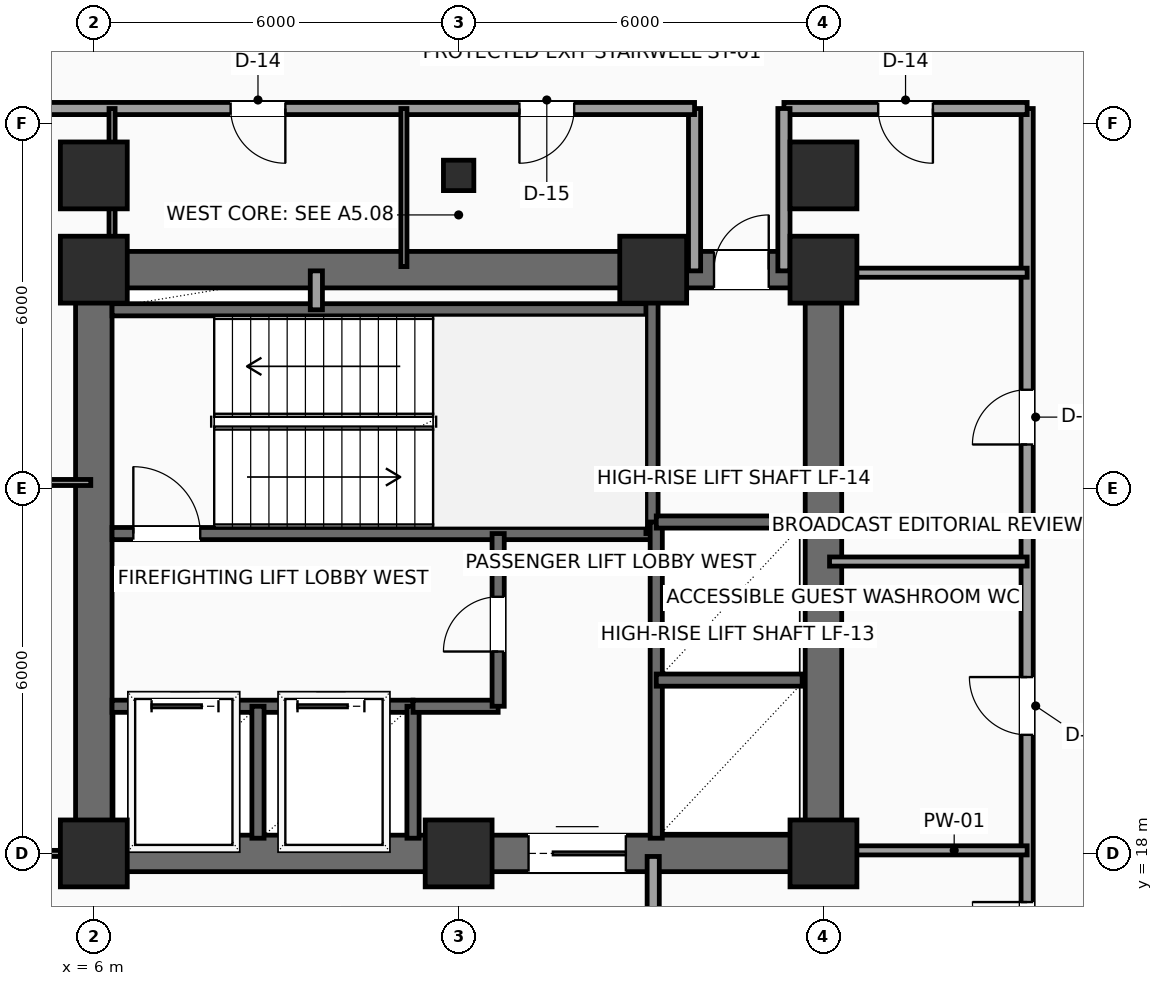
"""IFC4 building model, lengths in metres.
Left out: names, types, materials, properties, quantities, classifications, styles, units other than length and angle.
Written with IfcOpenShell. Run it as: python <this file> out.ifc"""

import sys

from ifc_helpers import new_model, si_unit, direction, frame, frame_2d, origin, origin_2d, place, context, subcontext, project, spatial, rectangle, hollow_rectangle, extrude, element, fill, save


model = new_model("IFC4")
c1 = context("Model", 3, precision=1e-05, world=origin(), true_north=direction((0.0, 1.0)))
c2 = subcontext(c1, "Body", "Model", "MODEL_VIEW")
j1 = project(units=[si_unit("LENGTHUNIT", "METRE"), si_unit("PLANEANGLEUNIT", "RADIAN")], contexts=[c1])
p1 = place(None, origin())
s1 = spatial("IfcSite", under=j1, at=p1, CompositionType="ELEMENT")
p2 = place(p1, origin())
s2 = spatial("IfcBuilding", under=s1, at=p2, CompositionType="ELEMENT")
p3 = place(p2, frame((0.0, 0.0, 138.15)))
s3 = spatial("IfcBuildingStorey", under=s2, at=p3, CompositionType="ELEMENT", Elevation=138.15)
for number, where, z_axis, x_axis in (
    (1, (6.0, 18.0, 0.0), (0.0, 0.0, 1.0), (1.0, 0.0, 0.0)),
    (2, (12.0, 18.0, 0.0), (0.0, 0.0, 1.0), (1.0, 0.0, 0.0)),
    (3, (18.0, 18.0, 0.0), (0.0, 0.0, 1.0), (1.0, 0.0, 0.0)),
    (4, (6.0, 27.6, 0.0), (0.0, 0.0, 1.0), (1.0, 0.0, 0.0)),
    (5, (15.2, 27.6, 0.0), (0.0, 0.0, 1.0), (1.0, 0.0, 0.0)),
    (6, (18.0, 27.6, 0.0), (0.0, 0.0, 1.0), (1.0, 0.0, 0.0)),
    (7, (6.0, 29.15, 0.0), (0.0, 0.0, 1.0), (1.0, 0.0, 0.0)),
):
    element("IfcColumn", number, at=place(p3, frame(where, z_axis=z_axis, x_axis=x_axis)), inside=s3, PredefinedType="COLUMN", context=c2, shape_type="SweptSolid", body=[
        extrude(rectangle(XDim=1.1, YDim=1.1, at=origin_2d()), origin(), (0.0, 0.0, 1.0), 3.75),
    ])
p4 = place(p3, frame((12.0, 29.15, 0.0), z_axis=(0.0, 0.0, 1.0), x_axis=(1.0, 0.0, 0.0)))
e8 = element("IfcColumn", 8, at=p4, inside=s3, PredefinedType="COLUMN", context=c2, shape_type="SweptSolid", body=[
    extrude(hollow_rectangle(XDim=0.5, YDim=0.5, WallThickness=0.025, InnerFilletRadius=0.025, OuterFilletRadius=0.04, at=origin_2d()), origin(), (0.0, 0.0, 1.0), 3.75),
])
p5 = place(p3, frame((18.0, 29.15, 0.0), z_axis=(0.0, 0.0, 1.0), x_axis=(1.0, 0.0, 0.0)))
e9 = element("IfcColumn", 9, at=p5, inside=s3, PredefinedType="COLUMN", context=c2, shape_type="SweptSolid", body=[
    extrude(rectangle(XDim=1.1, YDim=1.1, at=origin_2d()), origin(), (0.0, 0.0, 1.0), 3.75),
])
p6 = place(p3, frame((6.0, 18.0, 0.0), z_axis=(0.0, 0.0, 1.0), x_axis=(1.0, 0.0, 0.0)))
e10 = element("IfcWall", 10, at=p6, inside=s3, PredefinedType="SHEAR", context=c2, shape_type="SweptSolid", body=[
    extrude(rectangle(XDim=12.0, YDim=0.6, at=frame_2d((6.0, 0.0))), origin(), (0.0, 0.0, 1.0), 3.525),
])
p7 = place(p6, frame((7.15, 0.0, 0.0)))
e11 = element("IfcOpeningElement", 11, at=p7, cuts=e10, PredefinedType="OPENING", context=c2, shape_type="SweptSolid", body=[
    extrude(rectangle(XDim=1.6, YDim=2.3, at=frame_2d((0.8, 1.15))), frame((0.0, 0.31, 0.0), z_axis=(0.0, -1.0, 0.0), x_axis=(1.0, 0.0, 0.0)), (0.0, 0.0, 1.0), 0.62),
])
p8 = place(p3, frame((6.0, 27.6, 0.0), z_axis=(0.0, 0.0, 1.0), x_axis=(1.0, 0.0, 0.0)))
e12 = element("IfcWall", 12, at=p8, inside=s3, PredefinedType="SHEAR", context=c2, shape_type="SweptSolid", body=[
    extrude(rectangle(XDim=12.0, YDim=0.6, at=frame_2d((6.0, 0.0))), origin(), (0.0, 0.0, 1.0), 3.525),
])
p9 = place(p8, frame((10.2, 0.0, 0.0)))
e13 = element("IfcOpeningElement", 13, at=p9, cuts=e12, PredefinedType="OPENING", context=c2, shape_type="SweptSolid", body=[
    extrude(rectangle(XDim=0.9, YDim=2.15, at=frame_2d((0.45, 1.075))), frame((0.0, 0.31, 0.0), z_axis=(0.0, -1.0, 0.0), x_axis=(1.0, 0.0, 0.0)), (0.0, 0.0, 1.0), 0.62),
])
for number, where, z_axis, x_axis in (
    (14, (6.0, 18.0, 0.0), (0.0, 0.0, 1.0), (0.0, 1.0, 0.0)),
    (15, (18.0, 18.0, 0.0), (0.0, 0.0, 1.0), (0.0, 1.0, 0.0)),
):
    element("IfcWall", number, at=place(p3, frame(where, z_axis=z_axis, x_axis=x_axis)), inside=s3, PredefinedType="SHEAR", context=c2, shape_type="SweptSolid", body=[
        extrude(rectangle(XDim=9.6, YDim=0.6, at=frame_2d((4.8, 0.0))), origin(), (0.0, 0.0, 1.0), 3.525),
    ])
p10 = place(p3, frame((6.3, 23.26, 0.0), z_axis=(0.0, 0.0, 1.0), x_axis=(1.0, 0.0, 0.0)))
e16 = element("IfcWall", 16, at=p10, inside=s3, PredefinedType="SHEAR", context=c2, shape_type="SweptSolid", body=[
    extrude(rectangle(XDim=8.88, YDim=0.2, at=frame_2d((4.44, 0.0))), origin(), (0.0, 0.0, 1.0), 3.525),
])
p11 = place(p10, frame((0.35, 0.0, 0.0)))
e17 = element("IfcOpeningElement", 17, at=p11, cuts=e16, PredefinedType="OPENING", context=c2, shape_type="SweptSolid", body=[
    extrude(rectangle(XDim=1.1, YDim=2.2, at=frame_2d((0.55, 1.1))), frame((0.0, 0.11, 0.0), z_axis=(0.0, -1.0, 0.0), x_axis=(1.0, 0.0, 0.0)), (0.0, 0.0, 1.0), 0.22),
])
p12 = place(p3, frame((6.3, 26.94, 0.0), z_axis=(0.0, 0.0, 1.0), x_axis=(1.0, 0.0, 0.0)))
e18 = element("IfcWall", 18, at=p12, inside=s3, PredefinedType="SHEAR", context=c2, shape_type="SweptSolid", body=[
    extrude(rectangle(XDim=8.88, YDim=0.2, at=frame_2d((4.44, 0.0))), origin(), (0.0, 0.0, 1.0), 3.525),
])
p13 = place(p3, frame((15.18, 23.26, 0.0), z_axis=(0.0, 0.0, 1.0), x_axis=(0.0, 1.0, 0.0)))
e19 = element("IfcWall", 19, at=p13, inside=s3, PredefinedType="SHEAR", context=c2, shape_type="SweptSolid", body=[
    extrude(rectangle(XDim=4.04, YDim=0.2, at=frame_2d((2.02, 0.0))), origin(), (0.0, 0.0, 1.0), 3.525),
])
p14 = place(p3, frame((6.3, 20.42, 0.0), z_axis=(0.0, 0.0, 1.0), x_axis=(1.0, 0.0, 0.0)))
e20 = element("IfcWall", 20, at=p14, inside=s3, PredefinedType="SHEAR", context=c2, shape_type="SweptSolid", body=[
    extrude(rectangle(XDim=4.95, YDim=0.2, at=frame_2d((2.475, 0.0))), origin(), (0.0, 0.0, 1.0), 3.525),
])
p15 = place(p14, frame((0.65, 0.0, 0.0)))
e21 = element("IfcOpeningElement", 21, at=p15, cuts=e20, PredefinedType="OPENING", context=c2, shape_type="SweptSolid", body=[
    extrude(rectangle(XDim=1.1, YDim=2.2, at=frame_2d((0.55, 1.1))), frame((0.0, 0.11, 0.0), z_axis=(0.0, -1.0, 0.0), x_axis=(1.0, 0.0, 0.0)), (0.0, 0.0, 1.0), 0.22),
])
p16 = place(p14, frame((3.05, 0.0, 0.0)))
e22 = element("IfcOpeningElement", 22, at=p16, cuts=e20, PredefinedType="OPENING", context=c2, shape_type="SweptSolid", body=[
    extrude(rectangle(XDim=1.1, YDim=2.2, at=frame_2d((0.55, 1.1))), frame((0.0, 0.11, 0.0), z_axis=(0.0, -1.0, 0.0), x_axis=(1.0, 0.0, 0.0)), (0.0, 0.0, 1.0), 0.22),
])
for number, where, z_axis, x_axis in (
    (23, (8.7, 18.25, 0.0), (0.0, 0.0, 1.0), (0.0, 1.0, 0.0)),
    (24, (11.25, 18.25, 0.0), (0.0, 0.0, 1.0), (0.0, 1.0, 0.0)),
):
    element("IfcWall", number, at=place(p3, frame(where, z_axis=z_axis, x_axis=x_axis)), inside=s3, PredefinedType="SHEAR", context=c2, shape_type="SweptSolid", body=[
        extrude(rectangle(XDim=2.17, YDim=0.2, at=frame_2d((1.085, 0.0))), origin(), (0.0, 0.0, 1.0), 3.525),
    ])
p17 = place(p3, frame((11.25, 20.42, 0.0), z_axis=(0.0, 0.0, 1.0), x_axis=(1.0, 0.0, 0.0)))
e25 = element("IfcWall", 25, at=p17, inside=s3, PredefinedType="SHEAR", context=c2, shape_type="SweptSolid", body=[
    extrude(rectangle(XDim=1.4, YDim=0.2, at=frame_2d((0.7, 0.0))), origin(), (0.0, 0.0, 1.0), 3.525),
])
p18 = place(p3, frame((12.65, 20.42, 0.0), z_axis=(0.0, 0.0, 1.0), x_axis=(0.0, 1.0, 0.0)))
e26 = element("IfcWall", 26, at=p18, inside=s3, PredefinedType="SHEAR", context=c2, shape_type="SweptSolid", body=[
    extrude(rectangle(XDim=2.84, YDim=0.2, at=frame_2d((1.42, 0.0))), origin(), (0.0, 0.0, 1.0), 3.525),
])
p19 = place(p18, frame((0.9, 0.0, 0.0)))
e27 = element("IfcOpeningElement", 27, at=p19, cuts=e26, PredefinedType="OPENING", context=c2, shape_type="SweptSolid", body=[
    extrude(rectangle(XDim=0.9, YDim=2.15, at=frame_2d((0.45, 1.075))), frame((0.0, 0.11, 0.0), z_axis=(0.0, -1.0, 0.0), x_axis=(1.0, 0.0, 0.0)), (0.0, 0.0, 1.0), 0.22),
])
p20 = place(p3, frame((9.66, 26.94, 0.0), z_axis=(0.0, 0.0, 1.0), x_axis=(0.0, 1.0, 0.0)))
e28 = element("IfcWall", 28, at=p20, inside=s3, PredefinedType="SOLIDWALL", context=c2, shape_type="SweptSolid", body=[
    extrude(rectangle(XDim=0.64, YDim=0.2, at=frame_2d((0.32, 0.0))), origin(), (0.0, 0.0, 1.0), 3.525),
])
p21 = place(p3, frame((15.25, 18.25, 0.0), z_axis=(0.0, 0.0, 1.0), x_axis=(0.0, 1.0, 0.0)))
e29 = element("IfcWall", 29, at=p21, inside=s3, PredefinedType="SHEAR", context=c2, shape_type="SweptSolid", body=[
    extrude(rectangle(XDim=5.2, YDim=0.2, at=frame_2d((2.6, 0.0))), origin(), (0.0, 0.0, 1.0), 3.525),
])
p22 = place(p3, frame((15.25, 20.85, 0.0), z_axis=(0.0, 0.0, 1.0), x_axis=(1.0, 0.0, 0.0)))
e30 = element("IfcWall", 30, at=p22, inside=s3, PredefinedType="SHEAR", context=c2, shape_type="SweptSolid", body=[
    extrude(rectangle(XDim=2.4, YDim=0.2, at=frame_2d((1.2, 0.0))), origin(), (0.0, 0.0, 1.0), 3.525),
])
p23 = place(p3, frame((15.25, 23.45, 0.0), z_axis=(0.0, 0.0, 1.0), x_axis=(1.0, 0.0, 0.0)))
e31 = element("IfcWall", 31, at=p23, inside=s3, PredefinedType="SHEAR", context=c2, shape_type="SweptSolid", body=[
    extrude(rectangle(XDim=2.45, YDim=0.2, at=frame_2d((1.225, 0.0))), origin(), (0.0, 0.0, 1.0), 3.525),
])
p24 = place(p3, frame((15.2, 17.95, 0.0), z_axis=(0.0, 0.0, 1.0), x_axis=(0.0, -1.0, 0.0)))
e32 = element("IfcWall", 32, at=p24, inside=s3, PredefinedType="PARTITIONING", context=c2, shape_type="SweptSolid", body=[
    extrude(rectangle(XDim=2.4, YDim=0.2, at=frame_2d((1.2, 0.0))), origin(), (0.0, 0.0, 1.0), 3.525),
])
p25 = place(p3, frame((21.35, 11.25, 0.0), z_axis=(0.0, 0.0, 1.0), x_axis=(0.0, 1.0, 0.0)))
e33 = element("IfcWall", 33, at=p25, inside=s3, PredefinedType="PARTITIONING", context=c2, shape_type="SweptSolid", body=[
    extrude(rectangle(XDim=19.0, YDim=0.2, at=frame_2d((9.5, 0.0))), origin(), (0.0, 0.0, 1.0), 3.525),
])
p26 = place(p25, frame((8.7, 0.0, 0.0)))
e34 = element("IfcOpeningElement", 34, at=p26, cuts=e33, PredefinedType="OPENING", context=c2, shape_type="SweptSolid", body=[
    extrude(rectangle(XDim=0.95, YDim=2.15, at=frame_2d((0.475, 1.075))), frame((0.0, 0.11, 0.0), z_axis=(0.0, -1.0, 0.0), x_axis=(1.0, 0.0, 0.0)), (0.0, 0.0, 1.0), 0.22),
])
p27 = place(p25, frame((13.475, 0.0, 0.0)))
e35 = element("IfcOpeningElement", 35, at=p27, cuts=e33, PredefinedType="OPENING", context=c2, shape_type="SweptSolid", body=[
    extrude(rectangle(XDim=0.9, YDim=2.1, at=frame_2d((0.45, 1.05))), frame((0.0, 0.11, 0.0), z_axis=(0.0, -1.0, 0.0), x_axis=(1.0, 0.0, 0.0)), (0.0, 0.0, 1.0), 0.22),
])
p28 = place(p25, frame((5.05, 0.0, 0.0)))
e36 = element("IfcOpeningElement", 36, at=p28, cuts=e33, PredefinedType="OPENING", context=c2, shape_type="SweptSolid", body=[
    extrude(rectangle(XDim=0.9, YDim=2.1, at=frame_2d((0.45, 1.05))), frame((0.0, 0.11, 0.0), z_axis=(0.0, -1.0, 0.0), x_axis=(1.0, 0.0, 0.0)), (0.0, 0.0, 1.0), 0.22),
])
p29 = place(p3, frame((21.35, 30.25, 0.0), z_axis=(0.0, 0.0, 1.0), x_axis=(-1.0, 0.0, 0.0)))
e37 = element("IfcWall", 37, at=p29, inside=s3, PredefinedType="PARTITIONING", context=c2, shape_type="SweptSolid", body=[
    extrude(rectangle(XDim=4.0, YDim=0.2, at=frame_2d((2.0, 0.0))), origin(), (0.0, 0.0, 1.0), 3.525),
])
p30 = place(p29, frame((1.55, 0.0, 0.0)))
e38 = element("IfcOpeningElement", 38, at=p30, cuts=e37, PredefinedType="OPENING", context=c2, shape_type="SweptSolid", body=[
    extrude(rectangle(XDim=0.9, YDim=2.1, at=frame_2d((0.45, 1.05))), frame((0.0, 0.11, 0.0), z_axis=(0.0, -1.0, 0.0), x_axis=(1.0, 0.0, 0.0)), (0.0, 0.0, 1.0), 0.22),
])
for number, where, z_axis, x_axis in (
    (39, (17.35, 30.25, 0.0), (0.0, 0.0, 1.0), (0.0, -1.0, 0.0)),
    (40, (15.88, 27.58, 0.0), (0.0, 0.0, 1.0), (0.0, 1.0, 0.0)),
):
    element("IfcWall", number, at=place(p3, frame(where, z_axis=z_axis, x_axis=x_axis)), inside=s3, PredefinedType="PARTITIONING", context=c2, shape_type="SweptSolid", body=[
        extrude(rectangle(XDim=2.67, YDim=0.2, at=frame_2d((1.335, 0.0))), origin(), (0.0, 0.0, 1.0), 3.525),
    ])
p31 = place(p3, frame((15.88, 30.25, 0.0), z_axis=(0.0, 0.0, 1.0), x_axis=(-1.0, 0.0, 0.0)))
e41 = element("IfcWall", 41, at=p31, inside=s3, PredefinedType="PARTITIONING", context=c2, shape_type="SweptSolid", body=[
    extrude(rectangle(XDim=15.58, YDim=0.2, at=frame_2d((7.79, 0.0))), origin(), (0.0, 0.0, 1.0), 3.525),
])
p32 = place(p31, frame((12.28, 0.0, 0.0)))
e42 = element("IfcOpeningElement", 42, at=p32, cuts=e41, PredefinedType="OPENING", context=c2, shape_type="SweptSolid", body=[
    extrude(rectangle(XDim=0.9, YDim=2.1, at=frame_2d((0.45, 1.05))), frame((0.0, 0.11, 0.0), z_axis=(0.0, -1.0, 0.0), x_axis=(1.0, 0.0, 0.0)), (0.0, 0.0, 1.0), 0.22),
])
p33 = place(p31, frame((6.73, 0.0, 0.0)))
e43 = element("IfcOpeningElement", 43, at=p33, cuts=e41, PredefinedType="OPENING", context=c2, shape_type="SweptSolid", body=[
    extrude(rectangle(XDim=0.9, YDim=2.1, at=frame_2d((0.45, 1.05))), frame((0.0, 0.11, 0.0), z_axis=(0.0, -1.0, 0.0), x_axis=(1.0, 0.0, 0.0)), (0.0, 0.0, 1.0), 0.22),
])
p34 = place(p31, frame((1.98, 0.0, 0.0)))
e44 = element("IfcOpeningElement", 44, at=p34, cuts=e41, PredefinedType="OPENING", context=c2, shape_type="SweptSolid", body=[
    extrude(rectangle(XDim=0.9, YDim=2.1, at=frame_2d((0.45, 1.05))), frame((0.0, 0.11, 0.0), z_axis=(0.0, -1.0, 0.0), x_axis=(1.0, 0.0, 0.0)), (0.0, 0.0, 1.0), 0.22),
])
p35 = place(p3, frame((18.1, 18.05, 0.0), z_axis=(0.0, 0.0, 1.0), x_axis=(1.0, 0.0, 0.0)))
e45 = element("IfcWall", 45, at=p35, inside=s3, PredefinedType="PARTITIONING", context=c2, shape_type="SweptSolid", body=[
    extrude(rectangle(XDim=3.25, YDim=0.15, at=frame_2d((1.625, 0.0))), origin(), (0.0, 0.0, 1.0), 3.017),
])
for number, where, z_axis, x_axis in (
    (46, (18.1, 22.8, 0.0), (0.0, 0.0, 1.0), (1.0, 0.0, 0.0)),
    (47, (18.1, 27.55, 0.0), (0.0, 0.0, 1.0), (1.0, 0.0, 0.0)),
):
    element("IfcWall", number, at=place(p3, frame(where, z_axis=z_axis, x_axis=x_axis)), inside=s3, PredefinedType="PARTITIONING", context=c2, shape_type="SweptSolid", body=[
        extrude(rectangle(XDim=3.25, YDim=0.15, at=frame_2d((1.625, 0.0))), origin(), (0.0, 0.0, 1.0), 3.525),
    ])
p36 = place(p3, frame((0.3, 18.0, 0.0), z_axis=(0.0, 0.0, 1.0), x_axis=(1.0, 0.0, 0.0)))
e48 = element("IfcWall", 48, at=p36, inside=s3, PredefinedType="PARTITIONING", context=c2, shape_type="SweptSolid", body=[
    extrude(rectangle(XDim=5.65, YDim=0.1, at=frame_2d((2.825, 0.0))), origin(), (0.0, 0.0, 1.0), 3.017),
])
p37 = place(p36, frame((2.4, 0.0, 0.0)))
e49 = element("IfcOpeningElement", 49, at=p37, cuts=e48, PredefinedType="OPENING", context=c2, shape_type="SweptSolid", body=[
    extrude(rectangle(XDim=0.9, YDim=2.1, at=frame_2d((0.45, 1.05))), frame((0.0, 0.06, 0.0), z_axis=(0.0, -1.0, 0.0), x_axis=(1.0, 0.0, 0.0)), (0.0, 0.0, 1.0), 0.12),
])
p38 = place(p3, frame((0.3, 24.1, 0.0), z_axis=(0.0, 0.0, 1.0), x_axis=(1.0, 0.0, 0.0)))
e50 = element("IfcWall", 50, at=p38, inside=s3, PredefinedType="PARTITIONING", context=c2, shape_type="SweptSolid", body=[
    extrude(rectangle(XDim=5.65, YDim=0.1, at=frame_2d((2.825, 0.0))), origin(), (0.0, 0.0, 1.0), 3.525),
])
for number, where, z_axis, x_axis in (
    (51, (6.3, 27.65, 0.0), (0.0, 0.0, 1.0), (0.0, 1.0, 0.0)),
    (52, (11.1, 27.65, 0.0), (0.0, 0.0, 1.0), (0.0, 1.0, 0.0)),
):
    element("IfcWall", number, at=place(p3, frame(where, z_axis=z_axis, x_axis=x_axis)), inside=s3, PredefinedType="PARTITIONING", context=c2, shape_type="SweptSolid", body=[
        extrude(rectangle(XDim=2.6, YDim=0.1, at=frame_2d((1.3, 0.0))), origin(), (0.0, 0.0, 1.0), 3.525),
    ])
p39 = place(p7, origin())
e53 = element("IfcDoor", 53, at=p39, inside=s3, OperationType="DOUBLE_DOOR_SLIDING", PredefinedType="DOOR", context=c2, shape_type="SweptSolid", body=[
    extrude(rectangle(XDim=1.6, YDim=2.3, at=frame_2d((0.8, 1.15))), frame((0.0, 0.025, 0.0), z_axis=(0.0, -1.0, 0.0), x_axis=(1.0, 0.0, 0.0)), (0.0, 0.0, 1.0), 0.05),
])
fill(e11, e53)
p40 = place(p9, origin())
e54 = element("IfcDoor", 54, at=p40, inside=s3, OperationType="SINGLE_SWING_RIGHT", PredefinedType="DOOR", context=c2, shape_type="SweptSolid", body=[
    extrude(rectangle(XDim=0.9, YDim=2.15, at=frame_2d((0.45, 1.075))), frame((0.0, 0.025, 0.0), z_axis=(0.0, -1.0, 0.0), x_axis=(1.0, 0.0, 0.0)), (0.0, 0.0, 1.0), 0.05),
])
fill(e13, e54)
p41 = place(p11, origin())
e55 = element("IfcDoor", 55, at=p41, inside=s3, OperationType="SINGLE_SWING_LEFT", PredefinedType="DOOR", context=c2, shape_type="SweptSolid", body=[
    extrude(rectangle(XDim=1.1, YDim=2.2, at=frame_2d((0.55, 1.1))), frame((0.0, 0.025, 0.0), z_axis=(0.0, -1.0, 0.0), x_axis=(1.0, 0.0, 0.0)), (0.0, 0.0, 1.0), 0.05),
])
fill(e17, e55)
p42 = place(p15, origin())
e56 = element("IfcDoor", 56, at=p42, inside=s3, OperationType="SLIDING_TO_LEFT", PredefinedType="DOOR", context=c2, shape_type="SweptSolid", body=[
    extrude(rectangle(XDim=1.1, YDim=2.2, at=frame_2d((0.55, 1.1))), frame((0.0, 0.025, 0.0), z_axis=(0.0, -1.0, 0.0), x_axis=(1.0, 0.0, 0.0)), (0.0, 0.0, 1.0), 0.05),
])
fill(e21, e56)
p43 = place(p16, origin())
e57 = element("IfcDoor", 57, at=p43, inside=s3, OperationType="SLIDING_TO_LEFT", PredefinedType="DOOR", context=c2, shape_type="SweptSolid", body=[
    extrude(rectangle(XDim=1.1, YDim=2.2, at=frame_2d((0.55, 1.1))), frame((0.0, 0.025, 0.0), z_axis=(0.0, -1.0, 0.0), x_axis=(1.0, 0.0, 0.0)), (0.0, 0.0, 1.0), 0.05),
])
fill(e22, e57)
p44 = place(p19, origin())
e58 = element("IfcDoor", 58, at=p44, inside=s3, OperationType="SINGLE_SWING_LEFT", PredefinedType="DOOR", context=c2, shape_type="SweptSolid", body=[
    extrude(rectangle(XDim=0.9, YDim=2.15, at=frame_2d((0.45, 1.075))), frame((0.0, 0.025, 0.0), z_axis=(0.0, -1.0, 0.0), x_axis=(1.0, 0.0, 0.0)), (0.0, 0.0, 1.0), 0.05),
])
fill(e27, e58)
p45 = place(p26, origin())
e59 = element("IfcDoor", 59, at=p45, inside=s3, OperationType="SINGLE_SWING_RIGHT", PredefinedType="DOOR", context=c2, shape_type="SweptSolid", body=[
    extrude(rectangle(XDim=0.95, YDim=2.15, at=frame_2d((0.475, 1.075))), frame((0.0, 0.025, 0.0), z_axis=(0.0, -1.0, 0.0), x_axis=(1.0, 0.0, 0.0)), (0.0, 0.0, 1.0), 0.05),
])
fill(e34, e59)
p46 = place(p27, origin())
e60 = element("IfcDoor", 60, at=p46, inside=s3, OperationType="SINGLE_SWING_LEFT", PredefinedType="DOOR", context=c2, shape_type="SweptSolid", body=[
    extrude(rectangle(XDim=0.9, YDim=2.1, at=frame_2d((0.45, 1.05))), frame((0.0, 0.025, 0.0), z_axis=(0.0, -1.0, 0.0), x_axis=(1.0, 0.0, 0.0)), (0.0, 0.0, 1.0), 0.05),
])
fill(e35, e60)
p47 = place(p28, origin())
e61 = element("IfcDoor", 61, at=p47, inside=s3, OperationType="SINGLE_SWING_RIGHT", PredefinedType="DOOR", context=c2, shape_type="SweptSolid", body=[
    extrude(rectangle(XDim=0.9, YDim=2.1, at=frame_2d((0.45, 1.05))), frame((0.0, 0.025, 0.0), z_axis=(0.0, -1.0, 0.0), x_axis=(1.0, 0.0, 0.0)), (0.0, 0.0, 1.0), 0.05),
])
fill(e36, e61)
p48 = place(p30, origin())
e62 = element("IfcDoor", 62, at=p48, inside=s3, OperationType="SINGLE_SWING_LEFT", PredefinedType="DOOR", context=c2, shape_type="SweptSolid", body=[
    extrude(rectangle(XDim=0.9, YDim=2.1, at=frame_2d((0.45, 1.05))), frame((0.0, 0.025, 0.0), z_axis=(0.0, -1.0, 0.0), x_axis=(1.0, 0.0, 0.0)), (0.0, 0.0, 1.0), 0.05),
])
fill(e38, e62)
p49 = place(p33, origin())
e63 = element("IfcDoor", 63, at=p49, inside=s3, OperationType="SINGLE_SWING_LEFT", PredefinedType="DOOR", context=c2, shape_type="SweptSolid", body=[
    extrude(rectangle(XDim=0.9, YDim=2.1, at=frame_2d((0.45, 1.05))), frame((0.0, 0.025, 0.0), z_axis=(0.0, -1.0, 0.0), x_axis=(1.0, 0.0, 0.0)), (0.0, 0.0, 1.0), 0.05),
])
fill(e43, e63)
p50 = place(p34, origin())
e64 = element("IfcDoor", 64, at=p50, inside=s3, OperationType="SINGLE_SWING_RIGHT", PredefinedType="DOOR", context=c2, shape_type="SweptSolid", body=[
    extrude(rectangle(XDim=0.9, YDim=2.1, at=frame_2d((0.45, 1.05))), frame((0.0, 0.025, 0.0), z_axis=(0.0, -1.0, 0.0), x_axis=(1.0, 0.0, 0.0)), (0.0, 0.0, 1.0), 0.05),
])
fill(e44, e64)
save(model, sys.argv[1])
